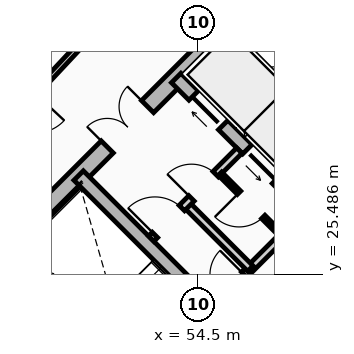
"""IFC4 building model, lengths in metres.
Left out: names, types, materials, properties, quantities, classifications, styles, units other than length and angle.
Written with IfcOpenShell. Run it as: python <this file> out.ifc"""

import sys

from ifc_helpers import new_model, si_unit, direction, frame, frame_2d, origin, place, context, subcontext, project, spatial, rectangle, extrude, source, transform, mapped, element, fill, save


model = new_model("IFC4")
c1 = context("Model", 3, precision=1e-05, world=origin(), true_north=direction((0.0, 1.0)))
c2 = subcontext(c1, "Body", "Model", "MODEL_VIEW")
j1 = project(units=[si_unit("LENGTHUNIT", "METRE"), si_unit("PLANEANGLEUNIT", "RADIAN")], contexts=[c1])
p1 = place(None, origin())
s1 = spatial("IfcSite", under=j1, at=p1, CompositionType="ELEMENT")
p2 = place(p1, origin())
s2 = spatial("IfcBuilding", under=s1, at=p2, CompositionType="ELEMENT")
p3 = place(p2, frame((0.0, 0.0, 70.15)))
s3 = spatial("IfcBuildingStorey", under=s2, at=p3, CompositionType="ELEMENT", Elevation=70.15)
for number, where, z_axis, x_axis in (
    (1, (58.737, 15.697, 0.0), (0.0, 0.0, 1.0), (-0.707, 0.707, 0.0)),
    (2, (66.303, 23.263, 0.0), (0.0, 0.0, 1.0), (-0.707, 0.707, 0.0)),
):
    element("IfcWall", number, at=place(p3, frame(where, z_axis=z_axis, x_axis=x_axis)), inside=s3, PredefinedType="SHEAR", context=c2, shape_type="SweptSolid", body=[
        extrude(rectangle(XDim=14.2, YDim=0.45, at=frame_2d((7.1, 0.0))), origin(), (0.0, 0.0, 1.0), 2.91),
    ])
p4 = place(p3, frame((48.856, 25.578, 0.0), z_axis=(0.0, 0.0, 1.0), x_axis=(0.707106781187, 0.707106781187, 0.0)))
e3 = element("IfcWall", 3, at=p4, inside=s3, PredefinedType="SHEAR", context=c2, shape_type="SweptSolid", body=[
    extrude(rectangle(XDim=10.7, YDim=0.45, at=frame_2d((5.35, 0.0))), origin(), (0.0, 0.0, 1.0), 2.91),
])
m1 = source(origin(), c2, "Body", "SweptSolid", [
    extrude(rectangle(XDim=1.5, YDim=2.02, at=frame_2d((0.75, 1.01))), frame((0.0, 0.235, 0.0), z_axis=(0.0, -1.0, 0.0), x_axis=(1.0, 0.0, 0.0)), (0.0, 0.0, 1.0), 0.47),
])
p5 = place(p4, frame((4.6, 0.0, 0.0)))
e4 = element("IfcOpeningElement", 4, at=p5, cuts=e3, PredefinedType="OPENING", context=c2, shape_type="MappedRepresentation", body=[
    mapped(m1, transform((0.0, 0.0, 0.0), x_axis=(1.0, 0.0, 0.0), y_axis=(0.0, 1.0, 0.0), z_axis=(0.0, 0.0, 1.0), scale=1.0)),
])
p6 = place(p3, frame((61.078, 18.355, 0.0), z_axis=(0.0, 0.0, 1.0), x_axis=(-0.707106781187, 0.707106781187, 0.0)))
e5 = element("IfcWall", 5, at=p6, inside=s3, PredefinedType="SHEAR", context=c2, shape_type="SweptSolid", body=[
    extrude(rectangle(XDim=13.75, YDim=0.35, at=frame_2d((6.875, 0.0))), origin(), (0.0, 0.0, 1.0), 2.91),
])
m2 = source(origin(), c2, "Body", "SweptSolid", [
    extrude(rectangle(XDim=1.1, YDim=2.015, at=frame_2d((0.55, 1.007))), frame((0.0, 0.185, 0.0), z_axis=(0.0, -1.0, 0.0), x_axis=(1.0, 0.0, 0.0)), (0.0, 0.0, 1.0), 0.37),
])
p7 = place(p6, frame((4.875, 0.0, 0.0)))
e6 = element("IfcOpeningElement", 6, at=p7, cuts=e5, PredefinedType="OPENING", context=c2, shape_type="MappedRepresentation", body=[
    mapped(m2, transform((0.0, 0.0, 0.0), x_axis=(1.0, 0.0, 0.0), y_axis=(0.0, 1.0, 0.0), z_axis=(0.0, 0.0, 1.0), scale=1.0)),
])
m3 = source(origin(), c2, "Body", "SweptSolid", [
    extrude(rectangle(XDim=1.15, YDim=2.02, at=frame_2d((0.575, 1.01))), frame((0.0, 0.185, 0.0), z_axis=(0.0, -1.0, 0.0), x_axis=(1.0, 0.0, 0.0)), (0.0, 0.0, 1.0), 0.37),
])
p8 = place(p6, frame((7.295, 0.0, 0.0)))
e7 = element("IfcOpeningElement", 7, at=p8, cuts=e5, PredefinedType="OPENING", context=c2, shape_type="MappedRepresentation", body=[
    mapped(m3, transform((0.0, 0.0, 0.0), x_axis=(1.0, 0.0, 0.0), y_axis=(0.0, 1.0, 0.0), z_axis=(0.0, 0.0, 1.0), scale=1.0)),
])
p9 = place(p3, frame((63.645, 20.922, 0.0), z_axis=(0.0, 0.0, 1.0), x_axis=(-0.707106781187, 0.707106781187, 0.0)))
e8 = element("IfcWall", 8, at=p9, inside=s3, PredefinedType="SHEAR", context=c2, shape_type="SweptSolid", body=[
    extrude(rectangle(XDim=13.75, YDim=0.35, at=frame_2d((6.875, 0.0))), origin(), (0.0, 0.0, 1.0), 2.91),
])
p10 = place(p9, frame((10.0, 0.0, 0.0)))
e9 = element("IfcOpeningElement", 9, at=p10, cuts=e8, PredefinedType="OPENING", context=c2, shape_type="MappedRepresentation", body=[
    mapped(m2, transform((0.0, 0.0, 0.0), x_axis=(1.0, 0.0, 0.0), y_axis=(0.0, 1.0, 0.0), z_axis=(0.0, 0.0, 1.0), scale=1.0)),
])
p11 = place(p9, frame((12.0, 0.0, 0.0)))
e10 = element("IfcOpeningElement", 10, at=p11, cuts=e8, PredefinedType="OPENING", context=c2, shape_type="MappedRepresentation", body=[
    mapped(m2, transform((0.0, 0.0, 0.0), x_axis=(1.0, 0.0, 0.0), y_axis=(0.0, 1.0, 0.0), z_axis=(0.0, 0.0, 1.0), scale=1.0)),
])
p12 = place(p9, frame((5.305, 0.0, 0.0)))
e11 = element("IfcOpeningElement", 11, at=p12, cuts=e8, PredefinedType="OPENING", context=c2, shape_type="MappedRepresentation", body=[
    mapped(m3, transform((0.0, 0.0, 0.0), x_axis=(1.0, 0.0, 0.0), y_axis=(0.0, 1.0, 0.0), z_axis=(0.0, 0.0, 1.0), scale=1.0)),
])
p13 = place(p3, frame((53.922, 21.141, 0.0), z_axis=(0.0, 0.0, 1.0), x_axis=(-0.707088616009, 0.707124945897, 0.0)))
e12 = element("IfcWall", 12, at=p13, inside=s3, PredefinedType="SHEAR", context=c2, shape_type="SweptSolid", body=[
    extrude(rectangle(XDim=6.72, YDim=0.35, at=frame_2d((3.36, 0.0))), origin(), (0.0, 0.0, 1.0), 2.91),
])
p14 = place(p3, frame((55.615, 29.227, 0.0), z_axis=(0.0, 0.0, 1.0), x_axis=(0.707147878904, 0.70706568108, 0.0)))
e13 = element("IfcWall", 13, at=p14, inside=s3, PredefinedType="SHEAR", context=c2, shape_type="SweptSolid", body=[
    extrude(rectangle(XDim=2.97, YDim=0.2, at=frame_2d((1.485, 0.0))), origin(), (0.0, 0.0, 1.0), 2.91),
])
p15 = place(p3, frame((57.419, 31.2, 0.0), z_axis=(0.0, 0.0, 1.0), x_axis=(-0.707032117043, 0.707181437447, 0.0)))
e14 = element("IfcWall", 14, at=p15, inside=s3, PredefinedType="SHEAR", context=c2, shape_type="SweptSolid", body=[
    extrude(rectangle(XDim=1.635, YDim=0.2, at=frame_2d((0.817, 0.0))), origin(), (0.0, 0.0, 1.0), 2.91),
])
p16 = place(p3, frame((54.961, 24.719, 0.0), z_axis=(0.0, 0.0, 1.0), x_axis=(0.707106781187, 0.707106781187, 0.0)))
e15 = element("IfcWall", 15, at=p16, inside=s3, PredefinedType="PARTITIONING", context=c2, shape_type="SweptSolid", body=[
    extrude(rectangle(XDim=3.28, YDim=0.2, at=frame_2d((1.64, 0.0))), origin(), (0.0, 0.0, 1.0), 2.655),
])
m4 = source(origin(), c2, "Body", "SweptSolid", [
    extrude(rectangle(XDim=0.9, YDim=2.005, at=frame_2d((0.45, 1.002))), frame((0.0, 0.11, 0.0), z_axis=(0.0, -1.0, 0.0), x_axis=(1.0, 0.0, 0.0)), (0.0, 0.0, 1.0), 0.22),
])
p17 = place(p16, frame((0.16, 0.0, 0.0)))
e16 = element("IfcOpeningElement", 16, at=p17, cuts=e15, PredefinedType="OPENING", context=c2, shape_type="MappedRepresentation", body=[
    mapped(m4, transform((0.0, 0.0, 0.0), x_axis=(1.0, 0.0, 0.0), y_axis=(0.0, 1.0, 0.0), z_axis=(0.0, 0.0, 1.0), scale=1.0)),
])
p18 = place(p3, frame((55.874, 25.631, 0.0), z_axis=(0.0, 0.0, 1.0), x_axis=(-0.707157639372, 0.707055919343, 0.0)))
e17 = element("IfcWall", 17, at=p18, inside=s3, PredefinedType="PARTITIONING", context=c2, shape_type="SweptSolid", body=[
    extrude(rectangle(XDim=2.4, YDim=0.2, at=frame_2d((1.2, 0.0))), origin(), (0.0, 0.0, 1.0), 2.655),
])
p19 = place(p3, frame((53.264, 26.416, 0.0), z_axis=(0.0, 0.0, 1.0), x_axis=(0.707106781187, 0.707106781187, 0.0)))
e18 = element("IfcWall", 18, at=p19, inside=s3, PredefinedType="PARTITIONING", context=c2, shape_type="SweptSolid", body=[
    extrude(rectangle(XDim=3.28, YDim=0.2, at=frame_2d((1.64, 0.0))), origin(), (0.0, 0.0, 1.0), 2.655),
])
m5 = source(origin(), c2, "Body", "SweptSolid", [
    extrude(rectangle(XDim=1.0, YDim=2.015, at=frame_2d((0.5, 1.007))), frame((0.0, 0.11, 0.0), z_axis=(0.0, -1.0, 0.0), x_axis=(1.0, 0.0, 0.0)), (0.0, 0.0, 1.0), 0.22),
])
p20 = place(p19, frame((0.14, 0.0, 0.0)))
e19 = element("IfcOpeningElement", 19, at=p20, cuts=e18, PredefinedType="OPENING", context=c2, shape_type="MappedRepresentation", body=[
    mapped(m5, transform((0.0, 0.0, 0.0), x_axis=(1.0, 0.0, 0.0), y_axis=(0.0, 1.0, 0.0), z_axis=(0.0, 0.0, 1.0), scale=1.0)),
])
p21 = place(p19, frame((1.5, 0.0, 0.0)))
e20 = element("IfcOpeningElement", 20, at=p21, cuts=e18, PredefinedType="OPENING", context=c2, shape_type="MappedRepresentation", body=[
    mapped(m4, transform((0.0, 0.0, 0.0), x_axis=(1.0, 0.0, 0.0), y_axis=(0.0, 1.0, 0.0), z_axis=(0.0, 0.0, 1.0), scale=1.0)),
])
p22 = place(p3, frame((56.673, 26.529, 0.0), z_axis=(0.0, 0.0, 1.0), x_axis=(-0.707052764397, 0.70716079385, 0.0)))
e21 = element("IfcWall", 21, at=p22, inside=s3, PredefinedType="PARTITIONING", context=c2, shape_type="SweptSolid", body=[
    extrude(rectangle(XDim=2.26, YDim=0.125, at=frame_2d((1.13, 0.0))), origin(), (0.0, 0.0, 1.0), 2.655),
])
m6 = source(origin(), c2, "Body", "SweptSolid", [
    extrude(rectangle(XDim=0.9, YDim=2.005, at=frame_2d((0.45, 1.002))), frame((0.0, 0.073, 0.0), z_axis=(0.0, -1.0, 0.0), x_axis=(1.0, 0.0, 0.0)), (0.0, 0.0, 1.0), 0.145),
])
p23 = place(p22, frame((0.65, 0.0, 0.0)))
e22 = element("IfcOpeningElement", 22, at=p23, cuts=e21, PredefinedType="OPENING", context=c2, shape_type="MappedRepresentation", body=[
    mapped(m6, transform((0.0, 0.0, 0.0), x_axis=(1.0, 0.0, 0.0), y_axis=(0.0, 1.0, 0.0), z_axis=(0.0, 0.0, 1.0), scale=1.0)),
])
p24 = place(p3, frame((52.079, 32.244, 0.0), z_axis=(0.0, 0.0, 1.0), x_axis=(-0.682703325574, -0.730695674854, 0.0)))
e23 = element("IfcWall", 23, at=p24, inside=s3, PredefinedType="PARTITIONING", context=c2, shape_type="SweptSolid", body=[
    extrude(rectangle(XDim=6.527, YDim=0.15, at=frame_2d((3.263, 0.0))), origin(), (0.0, 0.0, 1.0), 2.225),
])
m7 = source(origin(), c2, "Body", "SweptSolid", [
    extrude(rectangle(XDim=1.05, YDim=2.015, at=frame_2d((0.525, 1.007))), frame((0.0, 0.085, 0.0), z_axis=(0.0, -1.0, 0.0), x_axis=(1.0, 0.0, 0.0)), (0.0, 0.0, 1.0), 0.17),
])
p25 = place(p24, frame((2.738, 0.0, 0.0)))
e24 = element("IfcOpeningElement", 24, at=p25, cuts=e23, PredefinedType="OPENING", context=c2, shape_type="MappedRepresentation", body=[
    mapped(m7, transform((0.0, 0.0, 0.0), x_axis=(1.0, 0.0, 0.0), y_axis=(0.0, 1.0, 0.0), z_axis=(0.0, 0.0, 1.0), scale=1.0)),
])
m8 = source(origin(), c2, "Body", "SweptSolid", [
    extrude(rectangle(XDim=1.1, YDim=2.015, at=frame_2d((0.55, 1.007))), frame((0.0, 0.025, 0.0), z_axis=(0.0, -1.0, 0.0), x_axis=(1.0, 0.0, 0.0)), (0.0, 0.0, 1.0), 0.05),
])
p26 = place(p10, origin())
e25 = element("IfcDoor", 25, at=p26, inside=s3, OperationType="SLIDING_TO_LEFT", PredefinedType="DOOR", context=c2, shape_type="MappedRepresentation", body=[
    mapped(m8, transform((0.0, 0.0, 0.0), x_axis=(1.0, 0.0, 0.0), y_axis=(0.0, 1.0, 0.0), z_axis=(0.0, 0.0, 1.0), scale=1.0)),
])
fill(e9, e25)
p27 = place(p11, origin())
e26 = element("IfcDoor", 26, at=p27, inside=s3, OperationType="SLIDING_TO_RIGHT", PredefinedType="DOOR", context=c2, shape_type="MappedRepresentation", body=[
    mapped(m8, transform((0.0, 0.0, 0.0), x_axis=(1.0, 0.0, 0.0), y_axis=(0.0, 1.0, 0.0), z_axis=(0.0, 0.0, 1.0), scale=1.0)),
])
fill(e10, e26)
m9 = source(origin(), c2, "Body", "SweptSolid", [
    extrude(rectangle(XDim=1.5, YDim=2.02, at=frame_2d((0.75, 1.01))), frame((0.0, 0.025, 0.0), z_axis=(0.0, -1.0, 0.0), x_axis=(1.0, 0.0, 0.0)), (0.0, 0.0, 1.0), 0.05),
])
p28 = place(p5, origin())
e27 = element("IfcDoor", 27, at=p28, inside=s3, OperationType="DOUBLE_DOOR_SINGLE_SWING", PredefinedType="DOOR", context=c2, shape_type="MappedRepresentation", body=[
    mapped(m9, transform((0.0, 0.0, 0.0), x_axis=(1.0, 0.0, 0.0), y_axis=(0.0, 1.0, 0.0), z_axis=(0.0, 0.0, 1.0), scale=1.0)),
])
fill(e4, e27)
m10 = source(origin(), c2, "Body", "SweptSolid", [
    extrude(rectangle(XDim=0.9, YDim=2.005, at=frame_2d((0.45, 1.002))), frame((0.0, 0.025, 0.0), z_axis=(0.0, -1.0, 0.0), x_axis=(1.0, 0.0, 0.0)), (0.0, 0.0, 1.0), 0.05),
])
p29 = place(p17, origin())
e28 = element("IfcDoor", 28, at=p29, inside=s3, OperationType="SINGLE_SWING_RIGHT", PredefinedType="DOOR", context=c2, shape_type="MappedRepresentation", body=[
    mapped(m10, transform((0.0, 0.0, 0.0), x_axis=(1.0, 0.0, 0.0), y_axis=(0.0, 1.0, 0.0), z_axis=(0.0, 0.0, 1.0), scale=1.0)),
])
fill(e16, e28)
m11 = source(origin(), c2, "Body", "SweptSolid", [
    extrude(rectangle(XDim=1.0, YDim=2.015, at=frame_2d((0.5, 1.007))), frame((0.0, 0.025, 0.0), z_axis=(0.0, -1.0, 0.0), x_axis=(1.0, 0.0, 0.0)), (0.0, 0.0, 1.0), 0.05),
])
p30 = place(p20, origin())
e29 = element("IfcDoor", 29, at=p30, inside=s3, OperationType="SINGLE_SWING_LEFT", PredefinedType="DOOR", context=c2, shape_type="MappedRepresentation", body=[
    mapped(m11, transform((0.0, 0.0, 0.0), x_axis=(1.0, 0.0, 0.0), y_axis=(0.0, 1.0, 0.0), z_axis=(0.0, 0.0, 1.0), scale=1.0)),
])
fill(e19, e29)
p31 = place(p21, origin())
e30 = element("IfcDoor", 30, at=p31, inside=s3, OperationType="SINGLE_SWING_LEFT", PredefinedType="DOOR", context=c2, shape_type="MappedRepresentation", body=[
    mapped(m10, transform((0.0, 0.0, 0.0), x_axis=(1.0, 0.0, 0.0), y_axis=(0.0, 1.0, 0.0), z_axis=(0.0, 0.0, 1.0), scale=1.0)),
])
fill(e20, e30)
p32 = place(p23, origin())
e31 = element("IfcDoor", 31, at=p32, inside=s3, OperationType="SINGLE_SWING_RIGHT", PredefinedType="DOOR", context=c2, shape_type="MappedRepresentation", body=[
    mapped(m10, transform((0.0, 0.0, 0.0), x_axis=(1.0, 0.0, 0.0), y_axis=(0.0, 1.0, 0.0), z_axis=(0.0, 0.0, 1.0), scale=1.0)),
])
fill(e22, e31)
save(model, sys.argv[1])
